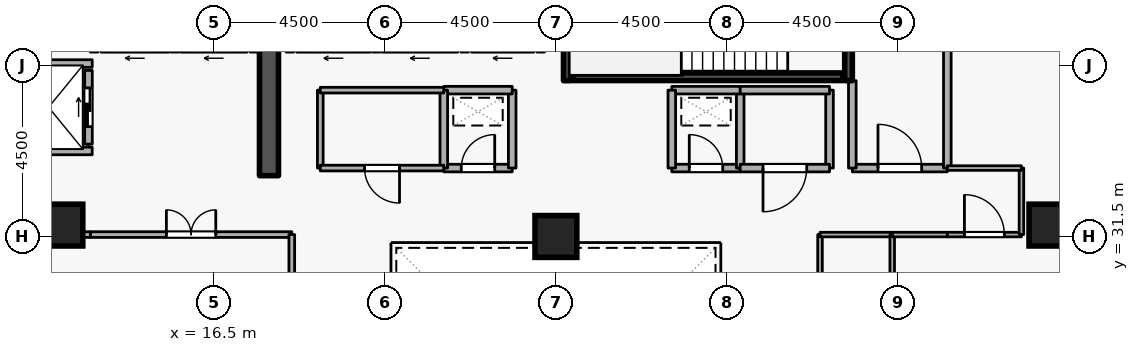
"""IFC4 building model, lengths in metres.
Left out: names, types, materials, properties, quantities, classifications, styles, units other than length and angle.
Written with IfcOpenShell. Run it as: python <this file> out.ifc"""

import sys

from ifc_helpers import new_model, si_unit, direction, frame, frame_2d, origin, origin_2d, place, context, subcontext, project, spatial, rectangle, extrude, element, fill, save


model = new_model("IFC4")
c1 = context("Model", 3, precision=1e-05, world=origin(), true_north=direction((0.0, 1.0)))
c2 = subcontext(c1, "Body", "Model", "MODEL_VIEW")
j1 = project(units=[si_unit("LENGTHUNIT", "METRE"), si_unit("PLANEANGLEUNIT", "RADIAN")], contexts=[c1])
p1 = place(None, origin())
s1 = spatial("IfcSite", under=j1, at=p1, CompositionType="ELEMENT")
p2 = place(p1, origin())
s2 = spatial("IfcBuilding", under=s1, at=p2, CompositionType="ELEMENT")
p3 = place(p2, frame((0.0, 0.0, 196.5)))
s3 = spatial("IfcBuildingStorey", under=s2, at=p3, CompositionType="ELEMENT", Elevation=196.5)
p4 = place(p3, frame((17.95, 33.1, 0.0), z_axis=(0.0, 0.0, 1.0), x_axis=(0.0, 1.0, 0.0)))
e1 = element("IfcWall", 1, at=p4, inside=s3, PredefinedType="SHEAR", context=c2, shape_type="SweptSolid", body=[
    extrude(rectangle(XDim=5.8, YDim=0.5, at=frame_2d((2.9, 0.0))), origin(), (0.0, 0.0, 1.0), 3.6),
])
for number, where, z_axis, x_axis in (
    (2, (12.5, 31.8, 0.0), (0.0, 0.0, 1.0), (1.0, 0.0, 0.0)),
    (3, (38.5, 31.8, 0.0), (0.0, 0.0, 1.0), (1.0, 0.0, 0.0)),
    (4, (25.5, 31.5, 0.0), (0.0, 0.0, 1.0), (1.0, 0.0, 0.0)),
):
    element("IfcColumn", number, at=place(p3, frame(where, z_axis=z_axis, x_axis=x_axis)), inside=s3, PredefinedType="COLUMN", context=c2, shape_type="SweptSolid", body=[
        extrude(rectangle(XDim=1.1, YDim=1.1, at=origin_2d()), origin(), (0.0, 0.0, 1.0), 3.6),
    ])
p5 = place(p3, frame((24.92, 36.45, 0.0), z_axis=(0.0, 0.0, 1.0), x_axis=(-1.0, 0.0, 0.0)))
e5 = element("IfcWall", 5, at=p5, inside=s3, PredefinedType="STANDARD", context=c2, shape_type="SweptSolid", body=[
    extrude(rectangle(XDim=1.64, YDim=0.2, at=frame_2d((0.82, 0.0))), origin(), (0.0, 0.0, 1.0), 3.32),
])
p6 = place(p5, frame((0.31, 0.0, 0.0)))
e6 = element("IfcOpeningElement", 6, at=p6, cuts=e5, PredefinedType="OPENING", context=c2, shape_type="SweptSolid", body=[
    extrude(rectangle(XDim=1.02, YDim=2.06, at=frame_2d((0.51, 1.03))), frame((0.0, 0.11, 0.0), z_axis=(0.0, -1.0, 0.0), x_axis=(1.0, 0.0, 0.0)), (0.0, 0.0, 1.0), 0.22),
])
p7 = place(p3, frame((22.92, 36.45, 0.0), z_axis=(0.0, 0.0, 1.0), x_axis=(-1.0, 0.0, 0.0)))
e7 = element("IfcWall", 7, at=p7, inside=s3, PredefinedType="STANDARD", context=c2, shape_type="SweptSolid", body=[
    extrude(rectangle(XDim=1.99, YDim=0.2, at=frame_2d((0.995, 0.0))), origin(), (0.0, 0.0, 1.0), 3.32),
])
p8 = place(p7, frame((0.485, 0.0, 0.0)))
e8 = element("IfcOpeningElement", 8, at=p8, cuts=e7, PredefinedType="OPENING", context=c2, shape_type="SweptSolid", body=[
    extrude(rectangle(XDim=1.02, YDim=2.06, at=frame_2d((0.51, 1.03))), frame((0.0, 0.11, 0.0), z_axis=(0.0, -1.0, 0.0), x_axis=(1.0, 0.0, 0.0)), (0.0, 0.0, 1.0), 0.22),
])
p9 = place(p3, frame((20.62, 36.45, 0.0), z_axis=(0.0, 0.0, 1.0), x_axis=(-1.0, 0.0, 0.0)))
e9 = element("IfcWall", 9, at=p9, inside=s3, PredefinedType="STANDARD", context=c2, shape_type="SweptSolid", body=[
    extrude(rectangle(XDim=1.94, YDim=0.2, at=frame_2d((0.97, 0.0))), origin(), (0.0, 0.0, 1.0), 3.32),
])
p10 = place(p9, frame((0.46, 0.0, 0.0)))
e10 = element("IfcOpeningElement", 10, at=p10, cuts=e9, PredefinedType="OPENING", context=c2, shape_type="SweptSolid", body=[
    extrude(rectangle(XDim=1.02, YDim=2.06, at=frame_2d((0.51, 1.03))), frame((0.0, 0.11, 0.0), z_axis=(0.0, -1.0, 0.0), x_axis=(1.0, 0.0, 0.0)), (0.0, 0.0, 1.0), 0.22),
])
p11 = place(p3, frame((17.37, 36.45, 0.0), z_axis=(0.0, 0.0, 1.0), x_axis=(-1.0, 0.0, 0.0)))
e11 = element("IfcWall", 11, at=p11, inside=s3, PredefinedType="STANDARD", context=c2, shape_type="SweptSolid", body=[
    extrude(rectangle(XDim=1.74, YDim=0.2, at=frame_2d((0.87, 0.0))), origin(), (0.0, 0.0, 1.0), 3.32),
])
p12 = place(p11, frame((0.36, 0.0, 0.0)))
e12 = element("IfcOpeningElement", 12, at=p12, cuts=e11, PredefinedType="OPENING", context=c2, shape_type="SweptSolid", body=[
    extrude(rectangle(XDim=1.02, YDim=2.06, at=frame_2d((0.51, 1.03))), frame((0.0, 0.11, 0.0), z_axis=(0.0, -1.0, 0.0), x_axis=(1.0, 0.0, 0.0)), (0.0, 0.0, 1.0), 0.22),
])
p13 = place(p3, frame((15.32, 36.45, 0.0), z_axis=(0.0, 0.0, 1.0), x_axis=(-1.0, 0.0, 0.0)))
e13 = element("IfcWall", 13, at=p13, inside=s3, PredefinedType="STANDARD", context=c2, shape_type="SweptSolid", body=[
    extrude(rectangle(XDim=1.79, YDim=0.2, at=frame_2d((0.895, 0.0))), origin(), (0.0, 0.0, 1.0), 3.32),
])
p14 = place(p13, frame((0.385, 0.0, 0.0)))
e14 = element("IfcOpeningElement", 14, at=p14, cuts=e13, PredefinedType="OPENING", context=c2, shape_type="SweptSolid", body=[
    extrude(rectangle(XDim=1.02, YDim=2.06, at=frame_2d((0.51, 1.03))), frame((0.0, 0.11, 0.0), z_axis=(0.0, -1.0, 0.0), x_axis=(1.0, 0.0, 0.0)), (0.0, 0.0, 1.0), 0.22),
])
p15 = place(p3, frame((13.2, 33.93, 0.0), z_axis=(0.0, 0.0, 1.0), x_axis=(0.0, 1.0, 0.0)))
e15 = element("IfcWall", 15, at=p15, inside=s3, PredefinedType="STANDARD", context=c2, shape_type="SweptSolid", body=[
    extrude(rectangle(XDim=1.94, YDim=0.2, at=frame_2d((0.97, 0.0))), origin(), (0.0, 0.0, 1.0), 3.32),
])
p16 = place(p15, frame((0.46, 0.0, 0.0)))
e16 = element("IfcOpeningElement", 16, at=p16, cuts=e15, PredefinedType="OPENING", context=c2, shape_type="SweptSolid", body=[
    extrude(rectangle(XDim=1.02, YDim=2.06, at=frame_2d((0.51, 1.03))), frame((0.0, 0.11, 0.0), z_axis=(0.0, -1.0, 0.0), x_axis=(1.0, 0.0, 0.0)), (0.0, 0.0, 1.0), 0.22),
])
for number, where, z_axis, x_axis in (
    (17, (11.002, 36.05, 0.0), (0.0, 0.0, 1.0), (1.0, 0.0, 0.0)),
    (18, (11.002, 33.75, 0.0), (0.0, 0.0, 1.0), (1.0, 0.0, 0.0)),
):
    element("IfcWall", number, at=place(p3, frame(where, z_axis=z_axis, x_axis=x_axis)), inside=s3, PredefinedType="STANDARD", context=c2, shape_type="SweptSolid", body=[
        extrude(rectangle(XDim=2.296, YDim=0.2, at=frame_2d((1.148, 0.0))), origin(), (0.0, 0.0, 1.0), 3.32),
    ])
p17 = place(p3, frame((33.2, 38.95, 0.0), z_axis=(0.0, 0.0, 1.0), x_axis=(0.0, -1.0, 0.0)))
e19 = element("IfcWall", 19, at=p17, inside=s3, PredefinedType="SHEAR", context=c2, shape_type="SweptSolid", body=[
    extrude(rectangle(XDim=3.35, YDim=0.2, at=frame_2d((1.675, 0.0))), origin(), (0.0, 0.0, 1.0), 3.6),
])
p18 = place(p17, frame((1.125, 0.0, 0.0)))
e20 = element("IfcOpeningElement", 20, at=p18, cuts=e19, PredefinedType="OPENING", context=c2, shape_type="SweptSolid", body=[
    extrude(rectangle(XDim=1.1, YDim=2.1, at=frame_2d((0.55, 1.05))), frame((0.0, 0.11, 0.0), z_axis=(0.0, -1.0, 0.0), x_axis=(1.0, 0.0, 0.0)), (0.0, 0.0, 1.0), 0.22),
])
p19 = place(p3, frame((25.8, 35.6, 0.0), z_axis=(0.0, 0.0, 1.0), x_axis=(0.0, 1.0, 0.0)))
e21 = element("IfcWall", 21, at=p19, inside=s3, PredefinedType="SHEAR", context=c2, shape_type="SweptSolid", body=[
    extrude(rectangle(XDim=3.35, YDim=0.2, at=frame_2d((1.675, 0.0))), origin(), (0.0, 0.0, 1.0), 3.6),
])
p20 = place(p3, frame((25.95, 35.703, 0.0), z_axis=(0.0, 0.0, 1.0), x_axis=(1.0, 0.0, 0.0)))
e22 = element("IfcWall", 22, at=p20, inside=s3, PredefinedType="SHEAR", context=c2, shape_type="SweptSolid", body=[
    extrude(rectangle(XDim=7.1, YDim=0.2, at=frame_2d((3.55, 0.0))), origin(), (0.0, 0.0, 1.0), 3.6),
])
p21 = place(p3, frame((33.3, 33.3, 0.0), z_axis=(0.0, 0.0, 1.0), x_axis=(1.0, 0.0, 0.0)))
e23 = element("IfcWall", 23, at=p21, inside=s3, PredefinedType="STANDARD", context=c2, shape_type="SweptSolid", body=[
    extrude(rectangle(XDim=2.5, YDim=0.2, at=frame_2d((1.25, 0.0))), origin(), (0.0, 0.0, 1.0), 3.32),
])
p22 = place(p21, frame((0.675, 0.0, 0.0)))
e24 = element("IfcOpeningElement", 24, at=p22, cuts=e23, PredefinedType="OPENING", context=c2, shape_type="SweptSolid", body=[
    extrude(rectangle(XDim=1.15, YDim=2.1, at=frame_2d((0.575, 1.05))), frame((0.0, 0.11, 0.0), z_axis=(0.0, -1.0, 0.0), x_axis=(1.0, 0.0, 0.0)), (0.0, 0.0, 1.0), 0.22),
])
p23 = place(p3, frame((35.8, 33.3, 0.0), z_axis=(0.0, 0.0, 1.0), x_axis=(0.0, 1.0, 0.0)))
e25 = element("IfcWall", 25, at=p23, inside=s3, PredefinedType="STANDARD", context=c2, shape_type="SweptSolid", body=[
    extrude(rectangle(XDim=5.7, YDim=0.2, at=frame_2d((2.85, 0.0))), origin(), (0.0, 0.0, 1.0), 3.32),
])
p24 = place(p3, frame((33.3, 35.6, 0.0), z_axis=(0.0, 0.0, 1.0), x_axis=(0.0, -1.0, 0.0)))
e26 = element("IfcWall", 26, at=p24, inside=s3, PredefinedType="STANDARD", context=c2, shape_type="SweptSolid", body=[
    extrude(rectangle(XDim=2.3, YDim=0.2, at=frame_2d((1.15, 0.0))), origin(), (0.0, 0.0, 1.0), 2.525),
])
p25 = place(p3, frame((22.55, 33.3, 0.0), z_axis=(0.0, 0.0, 1.0), x_axis=(1.0, 0.0, 0.0)))
e27 = element("IfcWall", 27, at=p25, inside=s3, PredefinedType="STANDARD", context=c2, shape_type="SweptSolid", body=[
    extrude(rectangle(XDim=1.8, YDim=0.2, at=frame_2d((0.9, 0.0))), origin(), (0.0, 0.0, 1.0), 3.32),
])
p26 = place(p25, frame((0.46, 0.0, 0.0)))
e28 = element("IfcOpeningElement", 28, at=p26, cuts=e27, PredefinedType="OPENING", context=c2, shape_type="SweptSolid", body=[
    extrude(rectangle(XDim=0.88, YDim=2.04, at=frame_2d((0.44, 1.02))), frame((0.0, 0.11, 0.0), z_axis=(0.0, -1.0, 0.0), x_axis=(1.0, 0.0, 0.0)), (0.0, 0.0, 1.0), 0.22),
])
p27 = place(p3, frame((24.35, 33.3, 0.0), z_axis=(0.0, 0.0, 1.0), x_axis=(0.0, 1.0, 0.0)))
e29 = element("IfcWall", 29, at=p27, inside=s3, PredefinedType="STANDARD", context=c2, shape_type="SweptSolid", body=[
    extrude(rectangle(XDim=2.05, YDim=0.2, at=frame_2d((1.025, 0.0))), origin(), (0.0, 0.0, 1.0), 3.32),
])
p28 = place(p3, frame((24.35, 35.35, 0.0), z_axis=(0.0, 0.0, 1.0), x_axis=(-1.0, 0.0, 0.0)))
e30 = element("IfcWall", 30, at=p28, inside=s3, PredefinedType="STANDARD", context=c2, shape_type="SweptSolid", body=[
    extrude(rectangle(XDim=1.8, YDim=0.2, at=frame_2d((0.9, 0.0))), origin(), (0.0, 0.0, 1.0), 3.32),
])
p29 = place(p3, frame((22.55, 35.35, 0.0), z_axis=(0.0, 0.0, 1.0), x_axis=(0.0, -1.0, 0.0)))
e31 = element("IfcWall", 31, at=p29, inside=s3, PredefinedType="STANDARD", context=c2, shape_type="SweptSolid", body=[
    extrude(rectangle(XDim=2.05, YDim=0.2, at=frame_2d((1.025, 0.0))), origin(), (0.0, 0.0, 1.0), 3.32),
])
p30 = place(p3, frame((28.55, 33.3, 0.0), z_axis=(0.0, 0.0, 1.0), x_axis=(1.0, 0.0, 0.0)))
e32 = element("IfcWall", 32, at=p30, inside=s3, PredefinedType="STANDARD", context=c2, shape_type="SweptSolid", body=[
    extrude(rectangle(XDim=1.8, YDim=0.2, at=frame_2d((0.9, 0.0))), origin(), (0.0, 0.0, 1.0), 3.32),
])
p31 = place(p30, frame((0.46, 0.0, 0.0)))
e33 = element("IfcOpeningElement", 33, at=p31, cuts=e32, PredefinedType="OPENING", context=c2, shape_type="SweptSolid", body=[
    extrude(rectangle(XDim=0.88, YDim=2.04, at=frame_2d((0.44, 1.02))), frame((0.0, 0.11, 0.0), z_axis=(0.0, -1.0, 0.0), x_axis=(1.0, 0.0, 0.0)), (0.0, 0.0, 1.0), 0.22),
])
p32 = place(p3, frame((30.35, 33.3, 0.0), z_axis=(0.0, 0.0, 1.0), x_axis=(0.0, 1.0, 0.0)))
e34 = element("IfcWall", 34, at=p32, inside=s3, PredefinedType="STANDARD", context=c2, shape_type="SweptSolid", body=[
    extrude(rectangle(XDim=2.05, YDim=0.2, at=frame_2d((1.025, 0.0))), origin(), (0.0, 0.0, 1.0), 3.32),
])
p33 = place(p3, frame((30.35, 35.35, 0.0), z_axis=(0.0, 0.0, 1.0), x_axis=(-1.0, 0.0, 0.0)))
e35 = element("IfcWall", 35, at=p33, inside=s3, PredefinedType="STANDARD", context=c2, shape_type="SweptSolid", body=[
    extrude(rectangle(XDim=1.8, YDim=0.2, at=frame_2d((0.9, 0.0))), origin(), (0.0, 0.0, 1.0), 3.32),
])
p34 = place(p3, frame((28.55, 35.35, 0.0), z_axis=(0.0, 0.0, 1.0), x_axis=(0.0, -1.0, 0.0)))
e36 = element("IfcWall", 36, at=p34, inside=s3, PredefinedType="STANDARD", context=c2, shape_type="SweptSolid", body=[
    extrude(rectangle(XDim=2.05, YDim=0.2, at=frame_2d((1.025, 0.0))), origin(), (0.0, 0.0, 1.0), 3.32),
])
p35 = place(p3, frame((32.7, 35.35, 0.0), z_axis=(0.0, 0.0, 1.0), x_axis=(0.0, -1.0, 0.0)))
e37 = element("IfcWall", 37, at=p35, inside=s3, PredefinedType="STANDARD", context=c2, shape_type="SweptSolid", body=[
    extrude(rectangle(XDim=2.05, YDim=0.2, at=frame_2d((1.025, 0.0))), origin(), (0.0, 0.0, 1.0), 2.525),
])
p36 = place(p3, frame((32.7, 33.3, 0.0), z_axis=(0.0, 0.0, 1.0), x_axis=(-1.0, 0.0, 0.0)))
e38 = element("IfcWall", 38, at=p36, inside=s3, PredefinedType="STANDARD", context=c2, shape_type="SweptSolid", body=[
    extrude(rectangle(XDim=2.35, YDim=0.2, at=frame_2d((1.175, 0.0))), origin(), (0.0, 0.0, 1.0), 3.32),
])
p37 = place(p36, frame((0.6, 0.0, 0.0)))
e39 = element("IfcOpeningElement", 39, at=p37, cuts=e38, PredefinedType="OPENING", context=c2, shape_type="SweptSolid", body=[
    extrude(rectangle(XDim=1.15, YDim=2.1, at=frame_2d((0.575, 1.05))), frame((0.0, 0.11, 0.0), z_axis=(0.0, -1.0, 0.0), x_axis=(1.0, 0.0, 0.0)), (0.0, 0.0, 1.0), 0.22),
])
p38 = place(p3, frame((30.35, 35.35, 0.0), z_axis=(0.0, 0.0, 1.0), x_axis=(1.0, 0.0, 0.0)))
e40 = element("IfcWall", 40, at=p38, inside=s3, PredefinedType="STANDARD", context=c2, shape_type="SweptSolid", body=[
    extrude(rectangle(XDim=2.35, YDim=0.2, at=frame_2d((1.175, 0.0))), origin(), (0.0, 0.0, 1.0), 3.32),
])
p39 = place(p3, frame((19.3, 33.3, 0.0), z_axis=(0.0, 0.0, 1.0), x_axis=(0.0, 1.0, 0.0)))
e41 = element("IfcWall", 41, at=p39, inside=s3, PredefinedType="PARTITIONING", context=c2, shape_type="SweptSolid", body=[
    extrude(rectangle(XDim=2.05, YDim=0.15, at=frame_2d((1.025, 0.0))), origin(), (0.0, 0.0, 1.0), 3.32),
])
p40 = place(p3, frame((19.3, 35.35, 0.0), z_axis=(0.0, 0.0, 1.0), x_axis=(1.0, 0.0, 0.0)))
e42 = element("IfcWall", 42, at=p40, inside=s3, PredefinedType="PARTITIONING", context=c2, shape_type="SweptSolid", body=[
    extrude(rectangle(XDim=3.25, YDim=0.15, at=frame_2d((1.625, 0.0))), origin(), (0.0, 0.0, 1.0), 3.32),
])
p41 = place(p3, frame((22.55, 33.3, 0.0), z_axis=(0.0, 0.0, 1.0), x_axis=(-1.0, 0.0, 0.0)))
e43 = element("IfcWall", 43, at=p41, inside=s3, PredefinedType="PARTITIONING", context=c2, shape_type="SweptSolid", body=[
    extrude(rectangle(XDim=3.25, YDim=0.15, at=frame_2d((1.625, 0.0))), origin(), (0.0, 0.0, 1.0), 3.32),
])
p42 = place(p41, frame((1.165, 0.0, 0.0)))
e44 = element("IfcOpeningElement", 44, at=p42, cuts=e43, PredefinedType="OPENING", context=c2, shape_type="SweptSolid", body=[
    extrude(rectangle(XDim=0.92, YDim=2.08, at=frame_2d((0.46, 1.04))), frame((0.0, 0.085, 0.0), z_axis=(0.0, -1.0, 0.0), x_axis=(1.0, 0.0, 0.0)), (0.0, 0.0, 1.0), 0.17),
])
p43 = place(p3, frame((13.25, 31.55, 0.0), z_axis=(0.0, 0.0, 1.0), x_axis=(1.0, 0.0, 0.0)))
e45 = element("IfcWall", 45, at=p43, inside=s3, PredefinedType="PARTITIONING", context=c2, shape_type="SweptSolid", body=[
    extrude(rectangle(XDim=5.3, YDim=0.15, at=frame_2d((2.65, 0.0))), origin(), (0.0, 0.0, 1.0), 3.32),
])
p44 = place(p43, frame((2.0, 0.0, 0.0)))
e46 = element("IfcOpeningElement", 46, at=p44, cuts=e45, PredefinedType="OPENING", context=c2, shape_type="SweptSolid", body=[
    extrude(rectangle(XDim=1.3, YDim=2.12, at=frame_2d((0.65, 1.06))), frame((0.0, 0.085, 0.0), z_axis=(0.0, -1.0, 0.0), x_axis=(1.0, 0.0, 0.0)), (0.0, 0.0, 1.0), 0.17),
])
p45 = place(p3, frame((18.55, 31.55, 0.0), z_axis=(0.0, 0.0, 1.0), x_axis=(0.0, -1.0, 0.0)))
e47 = element("IfcWall", 47, at=p45, inside=s3, PredefinedType="PARTITIONING", context=c2, shape_type="SweptSolid", body=[
    extrude(rectangle(XDim=2.25, YDim=0.15, at=frame_2d((1.125, 0.0))), origin(), (0.0, 0.0, 1.0), 3.32),
])
p46 = place(p3, frame((10.9, 31.55, 0.0), z_axis=(0.0, 0.0, 1.0), x_axis=(1.0, 0.0, 0.0)))
e48 = element("IfcWall", 48, at=p46, inside=s3, PredefinedType="PARTITIONING", context=c2, shape_type="SweptSolid", body=[
    extrude(rectangle(XDim=2.35, YDim=0.15, at=frame_2d((1.175, 0.0))), origin(), (0.0, 0.0, 1.0), 3.32),
])
p47 = place(p3, frame((32.45, 27.0, 0.0), z_axis=(0.0, 0.0, 1.0), x_axis=(0.0, 1.0, 0.0)))
e49 = element("IfcWall", 49, at=p47, inside=s3, PredefinedType="PARTITIONING", context=c2, shape_type="SweptSolid", body=[
    extrude(rectangle(XDim=4.55, YDim=0.12, at=frame_2d((2.275, 0.0))), origin(), (0.0, 0.0, 1.0), 3.32),
])
p48 = place(p47, frame((1.8, 0.0, 0.0)))
e50 = element("IfcOpeningElement", 50, at=p48, cuts=e49, PredefinedType="OPENING", context=c2, shape_type="SweptSolid", body=[
    extrude(rectangle(XDim=0.95, YDim=2.1, at=frame_2d((0.475, 1.05))), frame((0.0, 0.07, 0.0), z_axis=(0.0, -1.0, 0.0), x_axis=(1.0, 0.0, 0.0)), (0.0, 0.0, 1.0), 0.14),
])
p49 = place(p3, frame((32.45, 31.55, 0.0), z_axis=(0.0, 0.0, 1.0), x_axis=(1.0, 0.0, 0.0)))
e51 = element("IfcWall", 51, at=p49, inside=s3, PredefinedType="PARTITIONING", context=c2, shape_type="SweptSolid", body=[
    extrude(rectangle(XDim=1.9, YDim=0.12, at=frame_2d((0.95, 0.0))), origin(), (0.0, 0.0, 1.0), 3.32),
])
p50 = place(p3, frame((34.35, 31.55, 0.0), z_axis=(0.0, 0.0, 1.0), x_axis=(0.0, -1.0, 0.0)))
e52 = element("IfcWall", 52, at=p50, inside=s3, PredefinedType="PARTITIONING", context=c2, shape_type="SweptSolid", body=[
    extrude(rectangle(XDim=4.55, YDim=0.12, at=frame_2d((2.275, 0.0))), origin(), (0.0, 0.0, 1.0), 3.32),
])
p51 = place(p3, frame((34.35, 31.55, 0.0), z_axis=(0.0, 0.0, 1.0), x_axis=(1.0, 0.0, 0.0)))
e53 = element("IfcWall", 53, at=p51, inside=s3, PredefinedType="PARTITIONING", context=c2, shape_type="SweptSolid", body=[
    extrude(rectangle(XDim=1.45, YDim=0.12, at=frame_2d((0.725, 0.0))), origin(), (0.0, 0.0, 1.0), 3.32),
])
p52 = place(p3, frame((35.8, 31.55, 0.0), z_axis=(0.0, 0.0, 1.0), x_axis=(1.0, 0.0, 0.0)))
e54 = element("IfcWall", 54, at=p52, inside=s3, PredefinedType="PARTITIONING", context=c2, shape_type="SweptSolid", body=[
    extrude(rectangle(XDim=1.95, YDim=0.12, at=frame_2d((0.975, 0.0))), origin(), (0.0, 0.0, 1.0), 3.32),
])
p53 = place(p52, frame((0.45, 0.0, 0.0)))
e55 = element("IfcOpeningElement", 55, at=p53, cuts=e54, PredefinedType="OPENING", context=c2, shape_type="SweptSolid", body=[
    extrude(rectangle(XDim=1.05, YDim=2.1, at=frame_2d((0.525, 1.05))), frame((0.0, 0.07, 0.0), z_axis=(0.0, -1.0, 0.0), x_axis=(1.0, 0.0, 0.0)), (0.0, 0.0, 1.0), 0.14),
])
p54 = place(p3, frame((37.75, 31.55, 0.0), z_axis=(0.0, 0.0, 1.0), x_axis=(0.0, 1.0, 0.0)))
e56 = element("IfcWall", 56, at=p54, inside=s3, PredefinedType="PARTITIONING", context=c2, shape_type="SweptSolid", body=[
    extrude(rectangle(XDim=1.75, YDim=0.12, at=frame_2d((0.875, 0.0))), origin(), (0.0, 0.0, 1.0), 3.32),
])
p55 = place(p3, frame((37.75, 33.3, 0.0), z_axis=(0.0, 0.0, 1.0), x_axis=(-1.0, 0.0, 0.0)))
e57 = element("IfcWall", 57, at=p55, inside=s3, PredefinedType="PARTITIONING", context=c2, shape_type="SweptSolid", body=[
    extrude(rectangle(XDim=1.95, YDim=0.12, at=frame_2d((0.975, 0.0))), origin(), (0.0, 0.0, 1.0), 3.32),
])
p56 = place(p16, origin())
e58 = element("IfcDoor", 58, at=p56, inside=s3, OperationType="SLIDING_TO_LEFT", PredefinedType="DOOR", context=c2, shape_type="SweptSolid", body=[
    extrude(rectangle(XDim=1.02, YDim=2.06, at=frame_2d((0.51, 1.03))), frame((0.0, 0.025, 0.0), z_axis=(0.0, -1.0, 0.0), x_axis=(1.0, 0.0, 0.0)), (0.0, 0.0, 1.0), 0.05),
])
fill(e16, e58)
p57 = place(p22, origin())
e59 = element("IfcDoor", 59, at=p57, inside=s3, OperationType="SINGLE_SWING_LEFT", PredefinedType="DOOR", context=c2, shape_type="SweptSolid", body=[
    extrude(rectangle(XDim=1.15, YDim=2.1, at=frame_2d((0.575, 1.05))), frame((0.0, 0.025, 0.0), z_axis=(0.0, -1.0, 0.0), x_axis=(1.0, 0.0, 0.0)), (0.0, 0.0, 1.0), 0.05),
])
fill(e24, e59)
p58 = place(p26, origin())
e60 = element("IfcDoor", 60, at=p58, inside=s3, OperationType="SINGLE_SWING_RIGHT", PredefinedType="DOOR", context=c2, shape_type="SweptSolid", body=[
    extrude(rectangle(XDim=0.88, YDim=2.04, at=frame_2d((0.44, 1.02))), frame((0.0, 0.025, 0.0), z_axis=(0.0, -1.0, 0.0), x_axis=(1.0, 0.0, 0.0)), (0.0, 0.0, 1.0), 0.05),
])
fill(e28, e60)
p59 = place(p31, origin())
e61 = element("IfcDoor", 61, at=p59, inside=s3, OperationType="SINGLE_SWING_LEFT", PredefinedType="DOOR", context=c2, shape_type="SweptSolid", body=[
    extrude(rectangle(XDim=0.88, YDim=2.04, at=frame_2d((0.44, 1.02))), frame((0.0, 0.025, 0.0), z_axis=(0.0, -1.0, 0.0), x_axis=(1.0, 0.0, 0.0)), (0.0, 0.0, 1.0), 0.05),
])
fill(e33, e61)
p60 = place(p42, origin())
e62 = element("IfcDoor", 62, at=p60, inside=s3, OperationType="SINGLE_SWING_LEFT", PredefinedType="DOOR", context=c2, shape_type="SweptSolid", body=[
    extrude(rectangle(XDim=0.92, YDim=2.08, at=frame_2d((0.46, 1.04))), frame((0.0, 0.025, 0.0), z_axis=(0.0, -1.0, 0.0), x_axis=(1.0, 0.0, 0.0)), (0.0, 0.0, 1.0), 0.05),
])
fill(e44, e62)
p61 = place(p37, origin())
e63 = element("IfcDoor", 63, at=p61, inside=s3, OperationType="SINGLE_SWING_RIGHT", PredefinedType="DOOR", context=c2, shape_type="SweptSolid", body=[
    extrude(rectangle(XDim=1.15, YDim=2.1, at=frame_2d((0.575, 1.05))), frame((0.0, 0.025, 0.0), z_axis=(0.0, -1.0, 0.0), x_axis=(1.0, 0.0, 0.0)), (0.0, 0.0, 1.0), 0.05),
])
fill(e39, e63)
p62 = place(p44, origin())
e64 = element("IfcDoor", 64, at=p62, inside=s3, OperationType="DOUBLE_DOOR_SINGLE_SWING", PredefinedType="DOOR", context=c2, shape_type="SweptSolid", body=[
    extrude(rectangle(XDim=1.3, YDim=2.12, at=frame_2d((0.65, 1.06))), frame((0.0, 0.025, 0.0), z_axis=(0.0, -1.0, 0.0), x_axis=(1.0, 0.0, 0.0)), (0.0, 0.0, 1.0), 0.05),
])
fill(e46, e64)
p63 = place(p53, origin())
e65 = element("IfcDoor", 65, at=p63, inside=s3, OperationType="SINGLE_SWING_LEFT", PredefinedType="DOOR", context=c2, shape_type="SweptSolid", body=[
    extrude(rectangle(XDim=1.05, YDim=2.1, at=frame_2d((0.525, 1.05))), frame((0.0, 0.025, 0.0), z_axis=(0.0, -1.0, 0.0), x_axis=(1.0, 0.0, 0.0)), (0.0, 0.0, 1.0), 0.05),
])
fill(e55, e65)
save(model, sys.argv[1])
